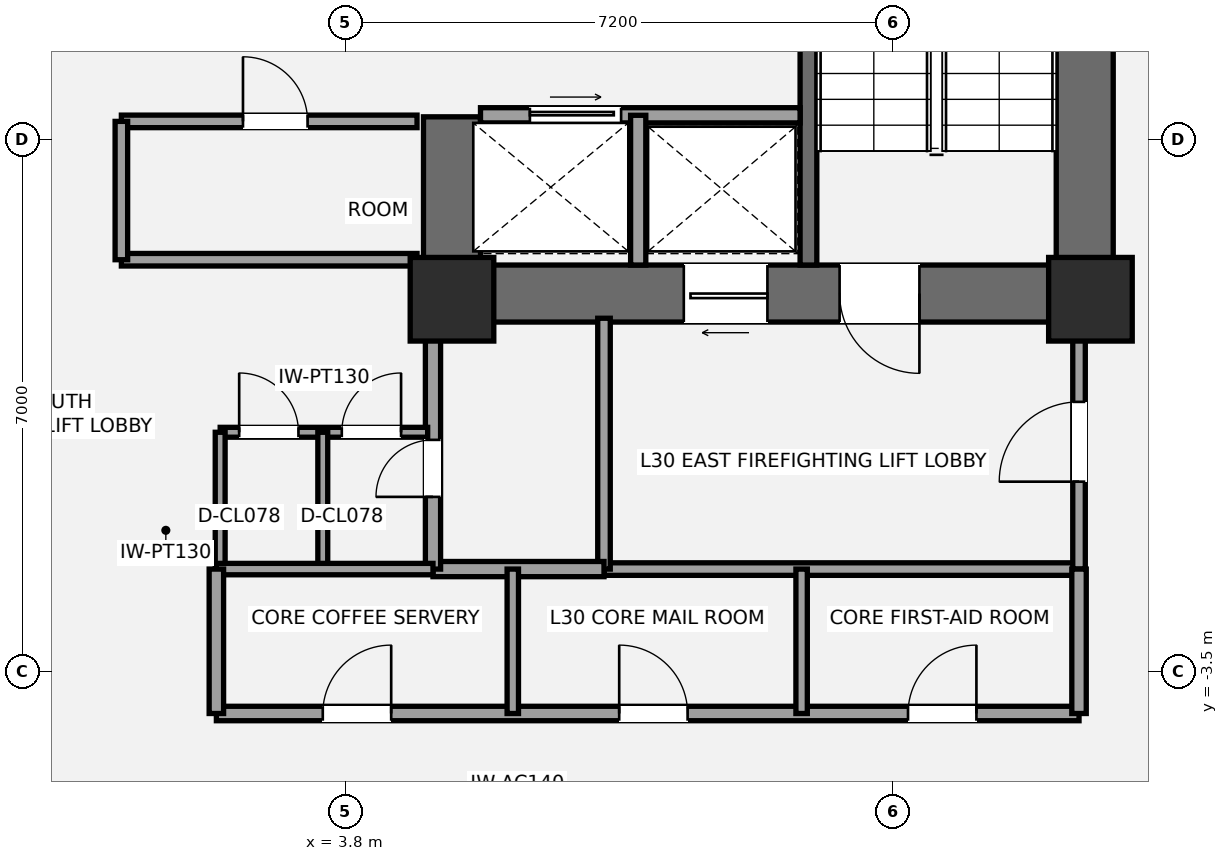
"""IFC4 building model, lengths in metres.
Left out: names, types, materials, properties, quantities, classifications, styles, units other than length and angle.
Written with IfcOpenShell. Run it as: python <this file> out.ifc"""

import sys

from ifc_helpers import new_model, si_unit, direction, frame, frame_2d, origin, origin_2d, place, context, subcontext, project, spatial, rectangle, extrude, element, fill, save


model = new_model("IFC4")
c1 = context("Model", 3, precision=1e-05, world=origin(), true_north=direction((0.0, 1.0)))
c2 = subcontext(c1, "Body", "Model", "MODEL_VIEW")
j1 = project(units=[si_unit("LENGTHUNIT", "METRE"), si_unit("PLANEANGLEUNIT", "RADIAN")], contexts=[c1])
p1 = place(None, origin())
s1 = spatial("IfcSite", under=j1, at=p1, CompositionType="ELEMENT")
p2 = place(p1, origin())
s2 = spatial("IfcBuilding", under=s1, at=p2, CompositionType="ELEMENT")
p3 = place(p2, frame((0.0, 0.0, 114.1)))
s3 = spatial("IfcBuildingStorey", under=s2, at=p3, CompositionType="ELEMENT", Elevation=114.1)
p4 = place(p3, frame((13.525, 1.1, 0.0), z_axis=(0.0, 0.0, 1.0), x_axis=(0.0, 1.0, 0.0)))
e1 = element("IfcWall", 1, at=p4, inside=s3, PredefinedType="SHEAR", context=c2, shape_type="SweptSolid", body=[
    extrude(rectangle(XDim=8.65, YDim=0.75, at=frame_2d((4.325, 0.0))), origin(), (0.0, 0.0, 1.0), 3.5),
])
p5 = place(p3, frame((13.9, 1.475, 0.0), z_axis=(0.0, 0.0, 1.0), x_axis=(-1.0, 0.0, 0.0)))
e2 = element("IfcWall", 2, at=p5, inside=s3, PredefinedType="SHEAR", context=c2, shape_type="SweptSolid", body=[
    extrude(rectangle(XDim=9.075, YDim=0.75, at=frame_2d((4.538, 0.0))), origin(), (0.0, 0.0, 1.0), 3.5),
])
p6 = place(p5, frame((2.55, 0.0, 0.0)))
e3 = element("IfcOpeningElement", 3, at=p6, cuts=e2, PredefinedType="OPENING", context=c2, shape_type="SweptSolid", body=[
    extrude(rectangle(XDim=1.05, YDim=2.15, at=frame_2d((0.525, 1.075))), frame((0.0, 0.385, 0.0), z_axis=(0.0, -1.0, 0.0), x_axis=(1.0, 0.0, 0.0)), (0.0, 0.0, 1.0), 0.77),
])
p7 = place(p5, frame((4.55, 0.0, 0.0)))
e4 = element("IfcOpeningElement", 4, at=p7, cuts=e2, PredefinedType="OPENING", context=c2, shape_type="SweptSolid", body=[
    extrude(rectangle(XDim=1.1, YDim=2.2, at=frame_2d((0.55, 1.1))), frame((0.0, 0.385, 0.0), z_axis=(0.0, -1.0, 0.0), x_axis=(1.0, 0.0, 0.0)), (0.0, 0.0, 1.0), 0.77),
])
p8 = place(p3, frame((5.2, 1.1, 0.0), z_axis=(0.0, 0.0, 1.0), x_axis=(0.0, 1.0, 0.0)))
e5 = element("IfcWall", 5, at=p8, inside=s3, PredefinedType="SHEAR", context=c2, shape_type="SweptSolid", body=[
    extrude(rectangle(XDim=2.7, YDim=0.75, at=frame_2d((1.35, 0.0))), origin(), (0.0, 0.0, 1.0), 3.5),
])
p9 = place(p3, frame((9.89, 1.85, 0.0), z_axis=(0.0, 0.0, 1.0), x_axis=(0.0, 1.0, 0.0)))
e6 = element("IfcWall", 6, at=p9, inside=s3, PredefinedType="SHEAR", context=c2, shape_type="SweptSolid", body=[
    extrude(rectangle(XDim=7.15, YDim=0.22, at=frame_2d((3.575, 0.0))), origin(), (0.0, 0.0, 1.0), 3.5),
])
for number, where, z_axis, x_axis in (
    (7, (5.2, 1.4, 0.0), (0.0, 0.0, 1.0), (1.0, 0.0, 0.0)),
    (8, (13.6, 1.4, 0.0), (0.0, 0.0, 1.0), (1.0, 0.0, 0.0)),
):
    element("IfcColumn", number, at=place(p3, frame(where, z_axis=z_axis, x_axis=x_axis)), inside=s3, PredefinedType="COLUMN", context=c2, shape_type="SweptSolid", body=[
        extrude(rectangle(XDim=1.1, YDim=1.1, at=origin_2d()), origin(), (0.0, 0.0, 1.0), 3.5),
    ])
p10 = place(p3, frame((7.2, -2.15, 0.0), z_axis=(0.0, 0.0, 1.0), x_axis=(1.0, 0.0, 0.0)))
e9 = element("IfcWall", 9, at=p10, inside=s3, PredefinedType="PARTITIONING", context=c2, shape_type="SweptSolid", body=[
    extrude(rectangle(XDim=6.25, YDim=0.165, at=frame_2d((3.125, 0.0))), origin(), (0.0, 0.0, 1.0), 3.31),
])
p11 = place(p3, frame((7.2, -2.15, 0.0), z_axis=(0.0, 0.0, 1.0), x_axis=(0.0, 1.0, 0.0)))
e10 = element("IfcWall", 10, at=p11, inside=s3, PredefinedType="PARTITIONING", context=c2, shape_type="SweptSolid", body=[
    extrude(rectangle(XDim=3.3, YDim=0.165, at=frame_2d((1.65, 0.0))), origin(), (0.0, 0.0, 1.0), 2.763),
])
p12 = place(p3, frame((13.45, -2.15, 0.0), z_axis=(0.0, 0.0, 1.0), x_axis=(0.0, 1.0, 0.0)))
e11 = element("IfcWall", 11, at=p12, inside=s3, PredefinedType="PARTITIONING", context=c2, shape_type="SweptSolid", body=[
    extrude(rectangle(XDim=3.3, YDim=0.165, at=frame_2d((1.65, 0.0))), origin(), (0.0, 0.0, 1.0), 2.763),
])
p13 = place(p12, frame((1.15, 0.0, 0.0)))
e12 = element("IfcOpeningElement", 12, at=p13, cuts=e11, PredefinedType="OPENING", context=c2, shape_type="SweptSolid", body=[
    extrude(rectangle(XDim=1.05, YDim=2.15, at=frame_2d((0.525, 1.075))), frame((0.0, 0.093, 0.0), z_axis=(0.0, -1.0, 0.0), x_axis=(1.0, 0.0, 0.0)), (0.0, 0.0, 1.0), 0.185),
])
p14 = place(p3, frame((4.95, -2.15, 0.0), z_axis=(0.0, 0.0, 1.0), x_axis=(1.0, 0.0, 0.0)))
e13 = element("IfcWall", 13, at=p14, inside=s3, PredefinedType="SOLIDWALL", context=c2, shape_type="SweptSolid", body=[
    extrude(rectangle(XDim=2.25, YDim=0.2, at=frame_2d((1.125, 0.0))), origin(), (0.0, 0.0, 1.0), 3.31),
])
p15 = place(p3, frame((4.95, -2.15, 0.0), z_axis=(0.0, 0.0, 1.0), x_axis=(0.0, 1.0, 0.0)))
e14 = element("IfcWall", 14, at=p15, inside=s3, PredefinedType="SOLIDWALL", context=c2, shape_type="SweptSolid", body=[
    extrude(rectangle(XDim=3.3, YDim=0.2, at=frame_2d((1.65, 0.0))), origin(), (0.0, 0.0, 1.0), 2.763),
])
p16 = place(p15, frame((0.95, 0.0, 0.0)))
e15 = element("IfcOpeningElement", 15, at=p16, cuts=e14, PredefinedType="OPENING", context=c2, shape_type="SweptSolid", body=[
    extrude(rectangle(XDim=0.75, YDim=2.1, at=frame_2d((0.375, 1.05))), frame((0.0, 0.11, 0.0), z_axis=(0.0, -1.0, 0.0), x_axis=(1.0, 0.0, 0.0)), (0.0, 0.0, 1.0), 0.22),
])
p17 = place(p3, frame((2.15, -0.35, 0.0), z_axis=(0.0, 0.0, 1.0), x_axis=(1.0, 0.0, 0.0)))
e16 = element("IfcWall", 16, at=p17, inside=s3, PredefinedType="PARTITIONING", context=c2, shape_type="SweptSolid", body=[
    extrude(rectangle(XDim=2.73, YDim=0.13, at=frame_2d((1.365, 0.0))), origin(), (0.0, 0.0, 1.0), 3.31),
])
p18 = place(p17, frame((0.25, 0.0, 0.0)))
e17 = element("IfcOpeningElement", 17, at=p18, cuts=e16, PredefinedType="OPENING", context=c2, shape_type="SweptSolid", body=[
    extrude(rectangle(XDim=0.78, YDim=2.1, at=frame_2d((0.39, 1.05))), frame((0.0, 0.075, 0.0), z_axis=(0.0, -1.0, 0.0), x_axis=(1.0, 0.0, 0.0)), (0.0, 0.0, 1.0), 0.15),
])
p19 = place(p17, frame((1.6, 0.0, 0.0)))
e18 = element("IfcOpeningElement", 18, at=p19, cuts=e16, PredefinedType="OPENING", context=c2, shape_type="SweptSolid", body=[
    extrude(rectangle(XDim=0.78, YDim=2.1, at=frame_2d((0.39, 1.05))), frame((0.0, 0.075, 0.0), z_axis=(0.0, -1.0, 0.0), x_axis=(1.0, 0.0, 0.0)), (0.0, 0.0, 1.0), 0.15),
])
for number, where, z_axis, x_axis in (
    (19, (2.15, -2.15, 0.0), (0.0, 0.0, 1.0), (0.0, 1.0, 0.0)),
    (20, (3.5, -2.15, 0.0), (0.0, 0.0, 1.0), (0.0, 1.0, 0.0)),
):
    element("IfcWall", number, at=place(p3, frame(where, z_axis=z_axis, x_axis=x_axis)), inside=s3, PredefinedType="PARTITIONING", context=c2, shape_type="SweptSolid", body=[
        extrude(rectangle(XDim=1.8, YDim=0.13, at=frame_2d((0.9, 0.0))), origin(), (0.0, 0.0, 1.0), 3.31),
    ])
p20 = place(p3, frame((5.575, 3.82, 0.0), z_axis=(0.0, 0.0, 1.0), x_axis=(1.0, 0.0, 0.0)))
e21 = element("IfcWall", 21, at=p20, inside=s3, PredefinedType="SOLIDWALL", context=c2, shape_type="SweptSolid", body=[
    extrude(rectangle(XDim=4.205, YDim=0.2, at=frame_2d((2.103, 0.0))), origin(), (0.0, 0.0, 1.0), 3.31),
])
p21 = place(p20, frame((0.65, 0.0, 0.0)))
e22 = element("IfcOpeningElement", 22, at=p21, cuts=e21, PredefinedType="OPENING", context=c2, shape_type="SweptSolid", body=[
    extrude(rectangle(XDim=1.2, YDim=2.2, at=frame_2d((0.6, 1.1))), frame((0.0, 0.11, 0.0), z_axis=(0.0, -1.0, 0.0), x_axis=(1.0, 0.0, 0.0)), (0.0, 0.0, 1.0), 0.22),
])
p22 = place(p3, frame((7.65, 1.85, 0.0), z_axis=(0.0, 0.0, 1.0), x_axis=(0.0, 1.0, 0.0)))
e23 = element("IfcWall", 23, at=p22, inside=s3, PredefinedType="SOLIDWALL", context=c2, shape_type="SweptSolid", body=[
    extrude(rectangle(XDim=1.97, YDim=0.2, at=frame_2d((0.985, 0.0))), origin(), (0.0, 0.0, 1.0), 3.31),
])
p23 = place(p3, frame((0.85, 1.92, 0.0), z_axis=(0.0, 0.0, 1.0), x_axis=(1.0, 0.0, 0.0)))
e24 = element("IfcWall", 24, at=p23, inside=s3, PredefinedType="PARTITIONING", context=c2, shape_type="SweptSolid", body=[
    extrude(rectangle(XDim=3.89, YDim=0.165, at=frame_2d((1.945, 0.0))), origin(), (0.0, 0.0, 1.0), 2.3),
])
p24 = place(p3, frame((0.85, 3.74, 0.0), z_axis=(0.0, 0.0, 1.0), x_axis=(1.0, 0.0, 0.0)))
e25 = element("IfcWall", 25, at=p24, inside=s3, PredefinedType="PARTITIONING", context=c2, shape_type="SweptSolid", body=[
    extrude(rectangle(XDim=3.89, YDim=0.165, at=frame_2d((1.945, 0.0))), origin(), (0.0, 0.0, 1.0), 3.31),
])
p25 = place(p24, frame((1.6, 0.0, 0.0)))
e26 = element("IfcOpeningElement", 26, at=p25, cuts=e25, PredefinedType="OPENING", context=c2, shape_type="SweptSolid", body=[
    extrude(rectangle(XDim=0.85, YDim=2.1, at=frame_2d((0.425, 1.05))), frame((0.0, 0.093, 0.0), z_axis=(0.0, -1.0, 0.0), x_axis=(1.0, 0.0, 0.0)), (0.0, 0.0, 1.0), 0.185),
])
p26 = place(p3, frame((0.85, 1.92, 0.0), z_axis=(0.0, 0.0, 1.0), x_axis=(0.0, 1.0, 0.0)))
e27 = element("IfcWall", 27, at=p26, inside=s3, PredefinedType="PARTITIONING", context=c2, shape_type="SweptSolid", body=[
    extrude(rectangle(XDim=1.82, YDim=0.165, at=frame_2d((0.91, 0.0))), origin(), (0.0, 0.0, 1.0), 3.31),
])
p27 = place(p3, frame((2.1, -4.05, 0.0), z_axis=(0.0, 0.0, 1.0), x_axis=(1.0, 0.0, 0.0)))
e28 = element("IfcWall", 28, at=p27, inside=s3, PredefinedType="PLUMBINGWALL", context=c2, shape_type="SweptSolid", body=[
    extrude(rectangle(XDim=11.35, YDim=0.19, at=frame_2d((5.675, 0.0))), origin(), (0.0, 0.0, 1.0), 2.763),
])
p28 = place(p27, frame((1.4, 0.0, 0.0)))
e29 = element("IfcOpeningElement", 29, at=p28, cuts=e28, PredefinedType="OPENING", context=c2, shape_type="SweptSolid", body=[
    extrude(rectangle(XDim=0.9, YDim=2.1, at=frame_2d((0.45, 1.05))), frame((0.0, 0.105, 0.0), z_axis=(0.0, -1.0, 0.0), x_axis=(1.0, 0.0, 0.0)), (0.0, 0.0, 1.0), 0.21),
])
p29 = place(p27, frame((5.3, 0.0, 0.0)))
e30 = element("IfcOpeningElement", 30, at=p29, cuts=e28, PredefinedType="OPENING", context=c2, shape_type="SweptSolid", body=[
    extrude(rectangle(XDim=0.9, YDim=2.1, at=frame_2d((0.45, 1.05))), frame((0.0, 0.105, 0.0), z_axis=(0.0, -1.0, 0.0), x_axis=(1.0, 0.0, 0.0)), (0.0, 0.0, 1.0), 0.21),
])
p30 = place(p27, frame((9.1, 0.0, 0.0)))
e31 = element("IfcOpeningElement", 31, at=p30, cuts=e28, PredefinedType="OPENING", context=c2, shape_type="SweptSolid", body=[
    extrude(rectangle(XDim=0.9, YDim=2.1, at=frame_2d((0.45, 1.05))), frame((0.0, 0.105, 0.0), z_axis=(0.0, -1.0, 0.0), x_axis=(1.0, 0.0, 0.0)), (0.0, 0.0, 1.0), 0.21),
])
p31 = place(p3, frame((2.1, -2.15, 0.0), z_axis=(0.0, 0.0, 1.0), x_axis=(1.0, 0.0, 0.0)))
e32 = element("IfcWall", 32, at=p31, inside=s3, PredefinedType="PLUMBINGWALL", context=c2, shape_type="SweptSolid", body=[
    extrude(rectangle(XDim=2.85, YDim=0.15, at=frame_2d((1.425, 0.0))), origin(), (0.0, 0.0, 1.0), 3.31),
])
for number, where, z_axis, x_axis in (
    (33, (2.1, -4.05, 0.0), (0.0, 0.0, 1.0), (0.0, 1.0, 0.0)),
    (34, (13.45, -4.05, 0.0), (0.0, 0.0, 1.0), (0.0, 1.0, 0.0)),
):
    element("IfcWall", number, at=place(p3, frame(where, z_axis=z_axis, x_axis=x_axis)), inside=s3, PredefinedType="PLUMBINGWALL", context=c2, shape_type="SweptSolid", body=[
        extrude(rectangle(XDim=1.9, YDim=0.19, at=frame_2d((0.95, 0.0))), origin(), (0.0, 0.0, 1.0), 3.31),
    ])
p32 = place(p3, frame((6.0, -4.05, 0.0), z_axis=(0.0, 0.0, 1.0), x_axis=(0.0, 1.0, 0.0)))
e35 = element("IfcWall", 35, at=p32, inside=s3, PredefinedType="PLUMBINGWALL", context=c2, shape_type="SweptSolid", body=[
    extrude(rectangle(XDim=1.9, YDim=0.15, at=frame_2d((0.95, 0.0))), origin(), (0.0, 0.0, 1.0), 2.763),
])
p33 = place(p3, frame((9.8, -4.05, 0.0), z_axis=(0.0, 0.0, 1.0), x_axis=(0.0, 1.0, 0.0)))
e36 = element("IfcWall", 36, at=p33, inside=s3, PredefinedType="PLUMBINGWALL", context=c2, shape_type="SweptSolid", body=[
    extrude(rectangle(XDim=1.9, YDim=0.15, at=frame_2d((0.95, 0.0))), origin(), (0.0, 0.0, 1.0), 3.31),
])
p34 = place(p6, origin())
e37 = element("IfcDoor", 37, at=p34, inside=s3, OperationType="SINGLE_SWING_LEFT", PredefinedType="DOOR", context=c2, shape_type="SweptSolid", body=[
    extrude(rectangle(XDim=1.05, YDim=2.15, at=frame_2d((0.525, 1.075))), frame((0.0, 0.025, 0.0), z_axis=(0.0, -1.0, 0.0), x_axis=(1.0, 0.0, 0.0)), (0.0, 0.0, 1.0), 0.05),
])
fill(e3, e37)
p35 = place(p13, origin())
e38 = element("IfcDoor", 38, at=p35, inside=s3, OperationType="SINGLE_SWING_LEFT", PredefinedType="DOOR", context=c2, shape_type="SweptSolid", body=[
    extrude(rectangle(XDim=1.05, YDim=2.15, at=frame_2d((0.525, 1.075))), frame((0.0, 0.025, 0.0), z_axis=(0.0, -1.0, 0.0), x_axis=(1.0, 0.0, 0.0)), (0.0, 0.0, 1.0), 0.05),
])
fill(e12, e38)
p36 = place(p16, origin())
e39 = element("IfcDoor", 39, at=p36, inside=s3, OperationType="SINGLE_SWING_LEFT", PredefinedType="DOOR", context=c2, shape_type="SweptSolid", body=[
    extrude(rectangle(XDim=0.75, YDim=2.1, at=frame_2d((0.375, 1.05))), frame((0.0, 0.025, 0.0), z_axis=(0.0, -1.0, 0.0), x_axis=(1.0, 0.0, 0.0)), (0.0, 0.0, 1.0), 0.05),
])
fill(e15, e39)
p37 = place(p18, origin())
e40 = element("IfcDoor", 40, at=p37, inside=s3, OperationType="SINGLE_SWING_LEFT", PredefinedType="DOOR", context=c2, shape_type="SweptSolid", body=[
    extrude(rectangle(XDim=0.78, YDim=2.1, at=frame_2d((0.39, 1.05))), frame((0.0, 0.025, 0.0), z_axis=(0.0, -1.0, 0.0), x_axis=(1.0, 0.0, 0.0)), (0.0, 0.0, 1.0), 0.05),
])
fill(e17, e40)
p38 = place(p19, origin())
e41 = element("IfcDoor", 41, at=p38, inside=s3, OperationType="SINGLE_SWING_RIGHT", PredefinedType="DOOR", context=c2, shape_type="SweptSolid", body=[
    extrude(rectangle(XDim=0.78, YDim=2.1, at=frame_2d((0.39, 1.05))), frame((0.0, 0.025, 0.0), z_axis=(0.0, -1.0, 0.0), x_axis=(1.0, 0.0, 0.0)), (0.0, 0.0, 1.0), 0.05),
])
fill(e18, e41)
p39 = place(p7, origin())
e42 = element("IfcDoor", 42, at=p39, inside=s3, OperationType="SLIDING_TO_LEFT", PredefinedType="DOOR", context=c2, shape_type="SweptSolid", body=[
    extrude(rectangle(XDim=1.1, YDim=2.2, at=frame_2d((0.55, 1.1))), frame((0.0, 0.025, 0.0), z_axis=(0.0, -1.0, 0.0), x_axis=(1.0, 0.0, 0.0)), (0.0, 0.0, 1.0), 0.05),
])
fill(e4, e42)
p40 = place(p21, origin())
e43 = element("IfcDoor", 43, at=p40, inside=s3, OperationType="SLIDING_TO_RIGHT", PredefinedType="DOOR", context=c2, shape_type="SweptSolid", body=[
    extrude(rectangle(XDim=1.2, YDim=2.2, at=frame_2d((0.6, 1.1))), frame((0.0, 0.025, 0.0), z_axis=(0.0, -1.0, 0.0), x_axis=(1.0, 0.0, 0.0)), (0.0, 0.0, 1.0), 0.05),
])
fill(e22, e43)
p41 = place(p25, origin())
e44 = element("IfcDoor", 44, at=p41, inside=s3, OperationType="SINGLE_SWING_LEFT", PredefinedType="DOOR", context=c2, shape_type="SweptSolid", body=[
    extrude(rectangle(XDim=0.85, YDim=2.1, at=frame_2d((0.425, 1.05))), frame((0.0, 0.025, 0.0), z_axis=(0.0, -1.0, 0.0), x_axis=(1.0, 0.0, 0.0)), (0.0, 0.0, 1.0), 0.05),
])
fill(e26, e44)
p42 = place(p28, origin())
e45 = element("IfcDoor", 45, at=p42, inside=s3, OperationType="SINGLE_SWING_RIGHT", PredefinedType="DOOR", context=c2, shape_type="SweptSolid", body=[
    extrude(rectangle(XDim=0.9, YDim=2.1, at=frame_2d((0.45, 1.05))), frame((0.0, 0.025, 0.0), z_axis=(0.0, -1.0, 0.0), x_axis=(1.0, 0.0, 0.0)), (0.0, 0.0, 1.0), 0.05),
])
fill(e29, e45)
p43 = place(p29, origin())
e46 = element("IfcDoor", 46, at=p43, inside=s3, OperationType="SINGLE_SWING_LEFT", PredefinedType="DOOR", context=c2, shape_type="SweptSolid", body=[
    extrude(rectangle(XDim=0.9, YDim=2.1, at=frame_2d((0.45, 1.05))), frame((0.0, 0.025, 0.0), z_axis=(0.0, -1.0, 0.0), x_axis=(1.0, 0.0, 0.0)), (0.0, 0.0, 1.0), 0.05),
])
fill(e30, e46)
p44 = place(p30, origin())
e47 = element("IfcDoor", 47, at=p44, inside=s3, OperationType="SINGLE_SWING_RIGHT", PredefinedType="DOOR", context=c2, shape_type="SweptSolid", body=[
    extrude(rectangle(XDim=0.9, YDim=2.1, at=frame_2d((0.45, 1.05))), frame((0.0, 0.025, 0.0), z_axis=(0.0, -1.0, 0.0), x_axis=(1.0, 0.0, 0.0)), (0.0, 0.0, 1.0), 0.05),
])
fill(e31, e47)
save(model, sys.argv[1])
